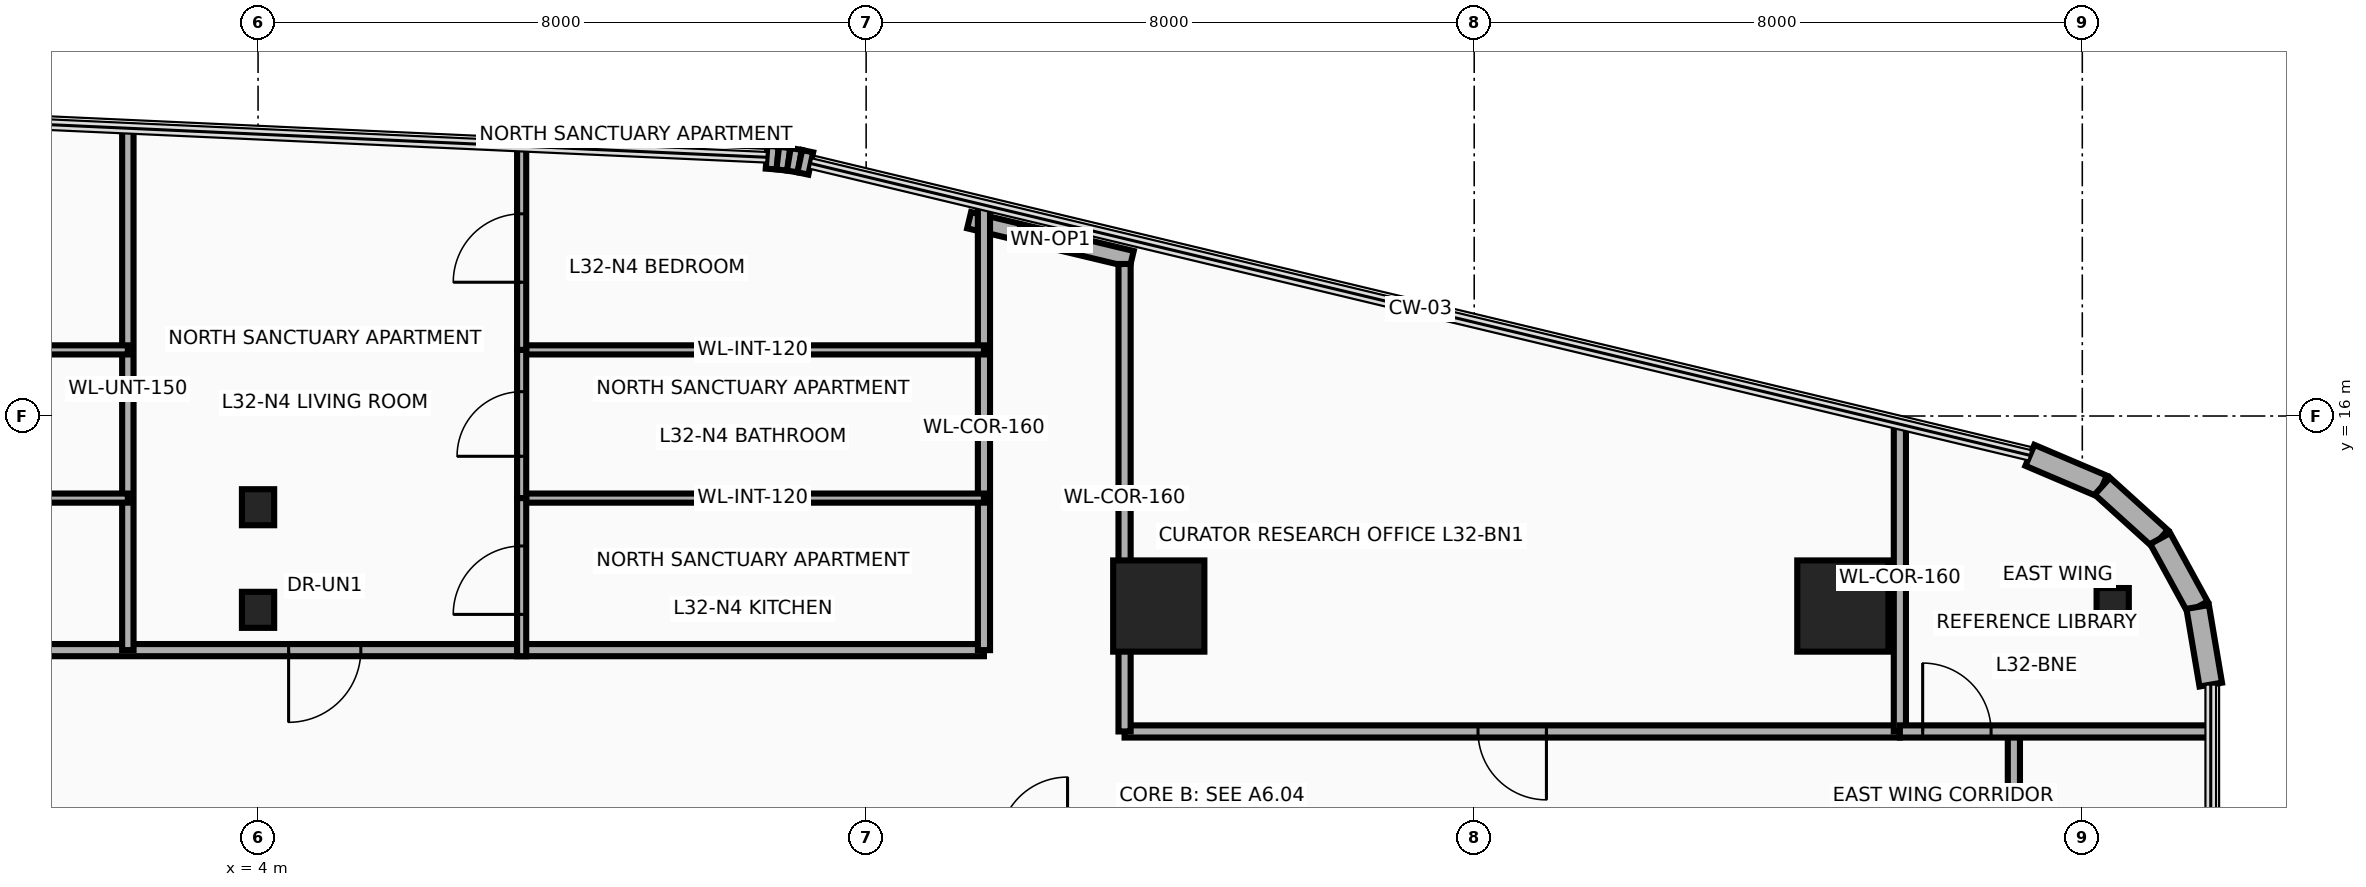
"""IFC4 building model, lengths in metres.
Left out: names, types, materials, properties, quantities, classifications, styles, units other than length and angle.
Written with IfcOpenShell. Run it as: python <this file> out.ifc"""

import sys

from ifc_helpers import new_model, si_unit, direction, frame, frame_2d, origin, origin_2d, place, context, subcontext, project, spatial, rectangle, i_section, extrude, source, transform, mapped, element, fill, save


model = new_model("IFC4")
c1 = context("Model", 3, precision=1e-05, world=origin(), true_north=direction((0.0, 1.0)))
c2 = subcontext(c1, "Body", "Model", "MODEL_VIEW")
j1 = project(units=[si_unit("LENGTHUNIT", "METRE"), si_unit("PLANEANGLEUNIT", "RADIAN")], contexts=[c1])
p1 = place(None, origin())
s1 = spatial("IfcSite", under=j1, at=p1, CompositionType="ELEMENT")
p2 = place(p1, origin())
s2 = spatial("IfcBuilding", under=s1, at=p2, CompositionType="ELEMENT")
p3 = place(p2, frame((0.0, 0.0, 127.9)))
s3 = spatial("IfcBuildingStorey", under=s2, at=p3, CompositionType="ELEMENT", Elevation=127.9)
m1 = source(origin(), c2, "Body", "SweptSolid", [
    extrude(rectangle(XDim=1.2, YDim=1.2, at=origin_2d()), origin(), (0.0, 0.0, 1.0), 3.7),
])
for number, where, z_axis, x_axis in (
    (1, (15.85, 13.5, 0.0), (0.0, 0.0, 1.0), (1.0, 0.0, 0.0)),
    (2, (24.85, 13.5, 0.0), (0.0, 0.0, 1.0), (1.0, 0.0, 0.0)),
):
    element("IfcColumn", number, at=place(p3, frame(where, z_axis=z_axis, x_axis=x_axis)), inside=s3, PredefinedType="COLUMN", context=c2, shape_type="MappedRepresentation", body=[
        mapped(m1, transform((0.0, 0.0, 0.0), x_axis=(1.0, 0.0, 0.0), y_axis=(0.0, 1.0, 0.0), z_axis=(0.0, 0.0, 1.0), scale=1.0)),
    ])
m2 = source(origin(), c2, "Body", "SweptSolid", [
    extrude(i_section(OverallWidth=0.424, OverallDepth=0.474, WebThickness=0.048, FlangeThickness=0.077, at=origin_2d()), origin(), (0.0, 0.0, 1.0), 3.7),
])
for number, where, z_axis, x_axis in (
    (3, (28.4, 13.5, 0.0), (0.0, 0.0, 1.0), (1.0, 0.0, 0.0)),
    (4, (4.0, 13.45, 0.0), (0.0, 0.0, 1.0), (1.0, 0.0, 0.0)),
    (5, (4.0, 14.8, 0.0), (0.0, 0.0, 1.0), (1.0, 0.0, 0.0)),
):
    element("IfcColumn", number, at=place(p3, frame(where, z_axis=z_axis, x_axis=x_axis)), inside=s3, PredefinedType="COLUMN", context=c2, shape_type="MappedRepresentation", body=[
        mapped(m2, transform((0.0, 0.0, 0.0), x_axis=(1.0, 0.0, 0.0), y_axis=(0.0, 1.0, 0.0), z_axis=(0.0, 0.0, 1.0), scale=1.0)),
    ])
p4 = place(p3, frame((10.69, 19.404, 0.0), z_axis=(0.0, 0.0, 1.0), x_axis=(0.99758310784, -0.069483400546, 0.0)))
e6 = element("IfcWall", 6, at=p4, inside=s3, PredefinedType="SOLIDWALL", context=c2, shape_type="SweptSolid", body=[
    extrude(rectangle(XDim=0.147, YDim=0.3, at=frame_2d((0.074, 0.0))), origin(), (0.0, 0.0, 1.0), 3.46),
])
for number, where, z_axis, x_axis in (
    (7, (10.837, 19.394, 0.0), (0.0, 0.0, 1.0), (0.993, -0.117, 0.0)),
    (8, (10.983, 19.377, 0.0), (0.0, 0.0, 1.0), (0.987, -0.163, 0.0)),
):
    element("IfcWall", number, at=place(p3, frame(where, z_axis=z_axis, x_axis=x_axis)), inside=s3, PredefinedType="SOLIDWALL", context=c2, shape_type="SweptSolid", body=[
        extrude(rectangle(XDim=0.146, YDim=0.3, at=frame_2d((0.073, 0.0))), origin(), (0.0, 0.0, 1.0), 3.46),
    ])
p5 = place(p3, frame((11.127, 19.353, 0.0), z_axis=(0.0, 0.0, 1.0), x_axis=(0.978019841688, -0.208511844421, 0.0)))
e9 = element("IfcWall", 9, at=p5, inside=s3, PredefinedType="SOLIDWALL", context=c2, shape_type="SweptSolid", body=[
    extrude(rectangle(XDim=0.147, YDim=0.3, at=frame_2d((0.074, 0.0))), origin(), (0.0, 0.0, 1.0), 3.46),
])
p6 = place(p3, frame((13.355, 18.576, 0.0), z_axis=(0.0, 0.0, 1.0), x_axis=(0.97252211384, -0.232810519721, 0.0)))
e10 = element("IfcWall", 10, at=p6, inside=s3, PredefinedType="SOLIDWALL", context=c2, shape_type="SweptSolid", body=[
    extrude(rectangle(XDim=2.2, YDim=0.22, at=frame_2d((1.1, 0.0))), origin(), (0.0, 0.0, 1.0), 3.46),
])
p7 = place(p6, frame((0.65, 0.0, 0.95)))
e11 = element("IfcOpeningElement", 11, at=p7, cuts=e10, PredefinedType="OPENING", context=c2, shape_type="SweptSolid", body=[
    extrude(rectangle(XDim=0.9, YDim=1.3, at=frame_2d((0.45, 0.65))), frame((0.0, 0.125, 0.0), z_axis=(0.0, -1.0, 0.0), x_axis=(1.0, 0.0, 0.0)), (0.0, 0.0, 1.0), 0.25),
])
p8 = place(p3, frame((27.31, 15.483, 0.0), z_axis=(0.0, 0.0, 1.0), x_axis=(0.920250328759, -0.391330208927, 0.0)))
e12 = element("IfcWall", 12, at=p8, inside=s3, PredefinedType="SOLIDWALL", context=c2, shape_type="SweptSolid", body=[
    extrude(rectangle(XDim=1.036, YDim=0.3, at=frame_2d((0.518, 0.0))), origin(), (0.0, 0.0, 1.0), 3.46),
])
p9 = place(p3, frame((28.264, 15.077, 0.0), z_axis=(0.0, 0.0, 1.0), x_axis=(0.741208839713, -0.671274501178, 0.0)))
e13 = element("IfcWall", 13, at=p9, inside=s3, PredefinedType="SOLIDWALL", context=c2, shape_type="SweptSolid", body=[
    extrude(rectangle(XDim=1.026, YDim=0.3, at=frame_2d((0.513, 0.0))), origin(), (0.0, 0.0, 1.0), 3.46),
])
p10 = place(p3, frame((29.025, 14.388, 0.0), z_axis=(0.0, 0.0, 1.0), x_axis=(0.480284137298, -0.87711296163, 0.0)))
e14 = element("IfcWall", 14, at=p10, inside=s3, PredefinedType="SOLIDWALL", context=c2, shape_type="SweptSolid", body=[
    extrude(rectangle(XDim=1.027, YDim=0.3, at=frame_2d((0.513, 0.0))), origin(), (0.0, 0.0, 1.0), 3.46),
])
p11 = place(p3, frame((29.518, 13.488, 0.0), z_axis=(0.0, 0.0, 1.0), x_axis=(0.166156796952, -0.986099345313, 0.0)))
e15 = element("IfcWall", 15, at=p11, inside=s3, PredefinedType="SOLIDWALL", context=c2, shape_type="SweptSolid", body=[
    extrude(rectangle(XDim=1.036, YDim=0.3, at=frame_2d((0.518, 0.0))), origin(), (0.0, 0.0, 1.0), 3.46),
])
p12 = place(p3, frame((-28.25, 12.92, 0.0), z_axis=(0.0, 0.0, 1.0), x_axis=(1.0, 0.0, 0.0)))
e16 = element("IfcWall", 16, at=p12, inside=s3, PredefinedType="PARTITIONING", context=c2, shape_type="SweptSolid", body=[
    extrude(rectangle(XDim=41.8, YDim=0.16, at=frame_2d((20.9, 0.0))), origin(), (0.0, 0.0, 1.0), 2.666),
])
p13 = place(p12, frame((0.763, 0.0, 0.0)))
e17 = element("IfcOpeningElement", 17, at=p13, cuts=e16, PredefinedType="OPENING", context=c2, shape_type="SweptSolid", body=[
    extrude(rectangle(XDim=0.95, YDim=2.15, at=frame_2d((0.475, 1.075))), frame((0.0, 0.095, 0.0), z_axis=(0.0, -1.0, 0.0), x_axis=(1.0, 0.0, 0.0)), (0.0, 0.0, 1.0), 0.19),
])
p14 = place(p12, frame((10.696, 0.0, 0.0)))
e18 = element("IfcOpeningElement", 18, at=p14, cuts=e16, PredefinedType="OPENING", context=c2, shape_type="SweptSolid", body=[
    extrude(rectangle(XDim=0.95, YDim=2.15, at=frame_2d((0.475, 1.075))), frame((0.0, 0.095, 0.0), z_axis=(0.0, -1.0, 0.0), x_axis=(1.0, 0.0, 0.0)), (0.0, 0.0, 1.0), 0.19),
])
p15 = place(p12, frame((22.215, 0.0, 0.0)))
e19 = element("IfcOpeningElement", 19, at=p15, cuts=e16, PredefinedType="OPENING", context=c2, shape_type="SweptSolid", body=[
    extrude(rectangle(XDim=0.95, YDim=2.15, at=frame_2d((0.475, 1.075))), frame((0.0, 0.095, 0.0), z_axis=(0.0, -1.0, 0.0), x_axis=(1.0, 0.0, 0.0)), (0.0, 0.0, 1.0), 0.19),
])
p16 = place(p12, frame((32.652, 0.0, 0.0)))
e20 = element("IfcOpeningElement", 20, at=p16, cuts=e16, PredefinedType="OPENING", context=c2, shape_type="SweptSolid", body=[
    extrude(rectangle(XDim=0.95, YDim=2.15, at=frame_2d((0.475, 1.075))), frame((0.0, 0.095, 0.0), z_axis=(0.0, -1.0, 0.0), x_axis=(1.0, 0.0, 0.0)), (0.0, 0.0, 1.0), 0.19),
])
p17 = place(p3, frame((13.55, 12.92, 0.0), z_axis=(0.0, 0.0, 1.0), x_axis=(0.0, 1.0, 0.0)))
e21 = element("IfcWall", 21, at=p17, inside=s3, PredefinedType="PARTITIONING", context=c2, shape_type="SweptSolid", body=[
    extrude(rectangle(XDim=5.857, YDim=0.16, at=frame_2d((2.928, 0.0))), origin(), (0.0, 0.0, 1.0), 2.666),
])
p18 = place(p3, frame((2.287, 12.92, 0.0), z_axis=(0.0, 0.0, 1.0), x_axis=(0.0, 1.0, 0.0)))
e22 = element("IfcWall", 22, at=p18, inside=s3, PredefinedType="PARTITIONING", context=c2, shape_type="SweptSolid", body=[
    extrude(rectangle(XDim=6.866, YDim=0.15, at=frame_2d((3.433, 0.0))), origin(), (0.0, 0.0, 1.0), 2.666),
])
p19 = place(p3, frame((-2.145, 14.92, 0.0), z_axis=(0.0, 0.0, 1.0), x_axis=(1.0, 0.0, 0.0)))
e23 = element("IfcWall", 23, at=p19, inside=s3, PredefinedType="PARTITIONING", context=c2, shape_type="SweptSolid", body=[
    extrude(rectangle(XDim=4.432, YDim=0.12, at=frame_2d((2.216, 0.0))), origin(), (0.0, 0.0, 1.0), 2.666),
])
p20 = place(p3, frame((-2.145, 16.87, 0.0), z_axis=(0.0, 0.0, 1.0), x_axis=(1.0, 0.0, 0.0)))
e24 = element("IfcWall", 24, at=p20, inside=s3, PredefinedType="PARTITIONING", context=c2, shape_type="SweptSolid", body=[
    extrude(rectangle(XDim=4.432, YDim=0.12, at=frame_2d((2.216, 0.0))), origin(), (0.0, 0.0, 1.0), 3.46),
])
for number, where, z_axis, x_axis in (
    (25, (7.468, 14.92, 0.0), (0.0, 0.0, 1.0), (1.0, 0.0, 0.0)),
    (26, (7.468, 16.87, 0.0), (0.0, 0.0, 1.0), (1.0, 0.0, 0.0)),
):
    element("IfcWall", number, at=place(p3, frame(where, z_axis=z_axis, x_axis=x_axis)), inside=s3, PredefinedType="PARTITIONING", context=c2, shape_type="SweptSolid", body=[
        extrude(rectangle(XDim=6.082, YDim=0.12, at=frame_2d((3.041, 0.0))), origin(), (0.0, 0.0, 1.0), 3.46),
    ])
p21 = place(p3, frame((7.468, 14.92, 0.0), z_axis=(0.0, 0.0, 1.0), x_axis=(0.0, 1.0, 0.0)))
e27 = element("IfcWall", 27, at=p21, inside=s3, PredefinedType="PARTITIONING", context=c2, shape_type="SweptSolid", body=[
    extrude(rectangle(XDim=1.95, YDim=0.12, at=frame_2d((0.975, 0.0))), origin(), (0.0, 0.0, 1.0), 3.46),
])
p22 = place(p21, frame((0.55, 0.0, 0.0)))
e28 = element("IfcOpeningElement", 28, at=p22, cuts=e27, PredefinedType="OPENING", context=c2, shape_type="SweptSolid", body=[
    extrude(rectangle(XDim=0.85, YDim=2.1, at=frame_2d((0.425, 1.05))), frame((0.0, 0.075, 0.0), z_axis=(0.0, -1.0, 0.0), x_axis=(1.0, 0.0, 0.0)), (0.0, 0.0, 1.0), 0.15),
])
p23 = place(p3, frame((7.468, 12.84, 0.0), z_axis=(0.0, 0.0, 1.0), x_axis=(0.0, 1.0, 0.0)))
e29 = element("IfcWall", 29, at=p23, inside=s3, PredefinedType="PARTITIONING", context=c2, shape_type="SweptSolid", body=[
    extrude(rectangle(XDim=2.08, YDim=0.12, at=frame_2d((1.04, 0.0))), origin(), (0.0, 0.0, 1.0), 2.666),
])
p24 = place(p23, frame((0.55, 0.0, 0.0)))
e30 = element("IfcOpeningElement", 30, at=p24, cuts=e29, PredefinedType="OPENING", context=c2, shape_type="SweptSolid", body=[
    extrude(rectangle(XDim=0.9, YDim=2.1, at=frame_2d((0.45, 1.05))), frame((0.0, 0.075, 0.0), z_axis=(0.0, -1.0, 0.0), x_axis=(1.0, 0.0, 0.0)), (0.0, 0.0, 1.0), 0.15),
])
p25 = place(p3, frame((7.468, 16.87, 0.0), z_axis=(0.0, 0.0, 1.0), x_axis=(0.0, 1.0, 0.0)))
e31 = element("IfcWall", 31, at=p25, inside=s3, PredefinedType="PARTITIONING", context=c2, shape_type="SweptSolid", body=[
    extrude(rectangle(XDim=2.68, YDim=0.12, at=frame_2d((1.34, 0.0))), origin(), (0.0, 0.0, 1.0), 3.46),
])
p26 = place(p25, frame((0.89, 0.0, 0.0)))
e32 = element("IfcOpeningElement", 32, at=p26, cuts=e31, PredefinedType="OPENING", context=c2, shape_type="SweptSolid", body=[
    extrude(rectangle(XDim=0.9, YDim=2.1, at=frame_2d((0.45, 1.05))), frame((0.0, 0.075, 0.0), z_axis=(0.0, -1.0, 0.0), x_axis=(1.0, 0.0, 0.0)), (0.0, 0.0, 1.0), 0.15),
])
p27 = place(p3, frame((15.4, 11.85, 0.0), z_axis=(0.0, 0.0, 1.0), x_axis=(1.0, 0.0, 0.0)))
e33 = element("IfcWall", 33, at=p27, inside=s3, PredefinedType="PARTITIONING", context=c2, shape_type="SweptSolid", body=[
    extrude(rectangle(XDim=10.2, YDim=0.16, at=frame_2d((5.1, 0.0))), origin(), (0.0, 0.0, 1.0), 2.834),
])
p28 = place(p27, frame((4.65, 0.0, 0.0)))
e34 = element("IfcOpeningElement", 34, at=p28, cuts=e33, PredefinedType="OPENING", context=c2, shape_type="SweptSolid", body=[
    extrude(rectangle(XDim=0.9, YDim=2.1, at=frame_2d((0.45, 1.05))), frame((0.0, 0.095, 0.0), z_axis=(0.0, -1.0, 0.0), x_axis=(1.0, 0.0, 0.0)), (0.0, 0.0, 1.0), 0.19),
])
p29 = place(p3, frame((15.4, 11.85, 0.0), z_axis=(0.0, 0.0, 1.0), x_axis=(0.0, 1.0, 0.0)))
e35 = element("IfcWall", 35, at=p29, inside=s3, PredefinedType="PARTITIONING", context=c2, shape_type="SweptSolid", body=[
    extrude(rectangle(XDim=6.15, YDim=0.16, at=frame_2d((3.075, 0.0))), origin(), (0.0, 0.0, 1.0), 2.666),
])
p30 = place(p3, frame((25.6, 11.85, 0.0), z_axis=(0.0, 0.0, 1.0), x_axis=(0.0, 1.0, 0.0)))
e36 = element("IfcWall", 36, at=p30, inside=s3, PredefinedType="PARTITIONING", context=c2, shape_type="SweptSolid", body=[
    extrude(rectangle(XDim=4.042, YDim=0.16, at=frame_2d((2.021, 0.0))), origin(), (0.0, 0.0, 1.0), 2.666),
])
p31 = place(p3, frame((27.1, -11.661, 0.0), z_axis=(0.0, 0.0, 1.0), x_axis=(0.0, 1.0, 0.0)))
e37 = element("IfcWall", 37, at=p31, inside=s3, PredefinedType="PARTITIONING", context=c2, shape_type="SweptSolid", body=[
    extrude(rectangle(XDim=23.511, YDim=0.16, at=frame_2d((11.755, 0.0))), origin(), (0.0, 0.0, 1.0), 2.666),
])
p32 = place(p31, frame((2.56, 0.0, 0.0)))
e38 = element("IfcOpeningElement", 38, at=p32, cuts=e37, PredefinedType="OPENING", context=c2, shape_type="SweptSolid", body=[
    extrude(rectangle(XDim=0.9, YDim=2.1, at=frame_2d((0.45, 1.05))), frame((0.0, 0.095, 0.0), z_axis=(0.0, -1.0, 0.0), x_axis=(1.0, 0.0, 0.0)), (0.0, 0.0, 1.0), 0.19),
])
p33 = place(p31, frame((9.451, 0.0, 0.0)))
e39 = element("IfcOpeningElement", 39, at=p33, cuts=e37, PredefinedType="OPENING", context=c2, shape_type="SweptSolid", body=[
    extrude(rectangle(XDim=1.8, YDim=2.15, at=frame_2d((0.9, 1.075))), frame((0.0, 0.095, 0.0), z_axis=(0.0, -1.0, 0.0), x_axis=(1.0, 0.0, 0.0)), (0.0, 0.0, 1.0), 0.19),
])
p34 = place(p31, frame((18.136, 0.0, 0.0)))
e40 = element("IfcOpeningElement", 40, at=p34, cuts=e37, PredefinedType="OPENING", context=c2, shape_type="SweptSolid", body=[
    extrude(rectangle(XDim=1.8, YDim=2.15, at=frame_2d((0.9, 1.075))), frame((0.0, 0.095, 0.0), z_axis=(0.0, -1.0, 0.0), x_axis=(1.0, 0.0, 0.0)), (0.0, 0.0, 1.0), 0.19),
])
p35 = place(p3, frame((25.6, 11.85, 0.0), z_axis=(0.0, 0.0, 1.0), x_axis=(1.0, 0.0, 0.0)))
e41 = element("IfcWall", 41, at=p35, inside=s3, PredefinedType="PARTITIONING", context=c2, shape_type="SweptSolid", body=[
    extrude(rectangle(XDim=4.09, YDim=0.16, at=frame_2d((2.045, 0.0))), origin(), (0.0, 0.0, 1.0), 2.896),
])
p36 = place(p35, frame((0.3, 0.0, 0.0)))
e42 = element("IfcOpeningElement", 42, at=p36, cuts=e41, PredefinedType="OPENING", context=c2, shape_type="SweptSolid", body=[
    extrude(rectangle(XDim=0.9, YDim=2.1, at=frame_2d((0.45, 1.05))), frame((0.0, 0.095, 0.0), z_axis=(0.0, -1.0, 0.0), x_axis=(1.0, 0.0, 0.0)), (0.0, 0.0, 1.0), 0.19),
])
p37 = place(p7, origin())
e43 = element("IfcWindow", 43, at=p37, inside=s3, PartitioningType="SINGLE_PANEL", PredefinedType="WINDOW", context=c2, shape_type="SweptSolid", body=[
    extrude(rectangle(XDim=0.9, YDim=1.3, at=frame_2d((0.45, 0.65))), frame((0.0, 0.03, 0.0), z_axis=(0.0, -1.0, 0.0), x_axis=(1.0, 0.0, 0.0)), (0.0, 0.0, 1.0), 0.06),
])
fill(e11, e43)
p38 = place(p16, frame((0.95, 0.0, 0.0), z_axis=(0.0, 0.0, 1.0), x_axis=(-1.0, 0.0, 0.0)))
e44 = element("IfcDoor", 44, at=p38, inside=s3, OperationType="SINGLE_SWING_LEFT", PredefinedType="DOOR", context=c2, shape_type="SweptSolid", body=[
    extrude(rectangle(XDim=0.95, YDim=2.15, at=frame_2d((0.475, 1.075))), frame((0.0, 0.025, 0.0), z_axis=(0.0, -1.0, 0.0), x_axis=(1.0, 0.0, 0.0)), (0.0, 0.0, 1.0), 0.05),
])
fill(e20, e44)
p39 = place(p22, origin())
e45 = element("IfcDoor", 45, at=p39, inside=s3, OperationType="SINGLE_SWING_RIGHT", PredefinedType="DOOR", context=c2, shape_type="SweptSolid", body=[
    extrude(rectangle(XDim=0.85, YDim=2.1, at=frame_2d((0.425, 1.05))), frame((0.0, 0.025, 0.0), z_axis=(0.0, -1.0, 0.0), x_axis=(1.0, 0.0, 0.0)), (0.0, 0.0, 1.0), 0.05),
])
fill(e28, e45)
p40 = place(p24, origin())
e46 = element("IfcDoor", 46, at=p40, inside=s3, OperationType="SINGLE_SWING_LEFT", PredefinedType="DOOR", context=c2, shape_type="SweptSolid", body=[
    extrude(rectangle(XDim=0.9, YDim=2.1, at=frame_2d((0.45, 1.05))), frame((0.0, 0.025, 0.0), z_axis=(0.0, -1.0, 0.0), x_axis=(1.0, 0.0, 0.0)), (0.0, 0.0, 1.0), 0.05),
])
fill(e30, e46)
p41 = place(p26, origin())
e47 = element("IfcDoor", 47, at=p41, inside=s3, OperationType="SINGLE_SWING_RIGHT", PredefinedType="DOOR", context=c2, shape_type="SweptSolid", body=[
    extrude(rectangle(XDim=0.9, YDim=2.1, at=frame_2d((0.45, 1.05))), frame((0.0, 0.025, 0.0), z_axis=(0.0, -1.0, 0.0), x_axis=(1.0, 0.0, 0.0)), (0.0, 0.0, 1.0), 0.05),
])
fill(e32, e47)
p42 = place(p28, frame((0.9, 0.0, 0.0), z_axis=(0.0, 0.0, 1.0), x_axis=(-1.0, 0.0, 0.0)))
e48 = element("IfcDoor", 48, at=p42, inside=s3, OperationType="SINGLE_SWING_LEFT", PredefinedType="DOOR", context=c2, shape_type="SweptSolid", body=[
    extrude(rectangle(XDim=0.9, YDim=2.1, at=frame_2d((0.45, 1.05))), frame((0.0, 0.025, 0.0), z_axis=(0.0, -1.0, 0.0), x_axis=(1.0, 0.0, 0.0)), (0.0, 0.0, 1.0), 0.05),
])
fill(e34, e48)
p43 = place(p36, origin())
e49 = element("IfcDoor", 49, at=p43, inside=s3, OperationType="SINGLE_SWING_LEFT", PredefinedType="DOOR", context=c2, shape_type="SweptSolid", body=[
    extrude(rectangle(XDim=0.9, YDim=2.1, at=frame_2d((0.45, 1.05))), frame((0.0, 0.025, 0.0), z_axis=(0.0, -1.0, 0.0), x_axis=(1.0, 0.0, 0.0)), (0.0, 0.0, 1.0), 0.05),
])
fill(e42, e49)
save(model, sys.argv[1])
